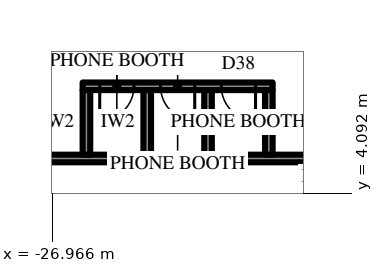
"""IFC4 building model, lengths in metres.
Left out: names, types, materials, properties, quantities, classifications, styles, units other than length and angle.
Written with IfcOpenShell. Run it as: python <this file> out.ifc"""

import sys

from ifc_helpers import new_model, si_unit, direction, frame, frame_2d, origin, place, context, subcontext, project, spatial, rectangle, extrude, element, fill, save


model = new_model("IFC4")
c1 = context("Model", 3, precision=1e-05, world=origin(), true_north=direction((0.0, 1.0)))
c2 = subcontext(c1, "Body", "Model", "MODEL_VIEW")
j1 = project(units=[si_unit("LENGTHUNIT", "METRE"), si_unit("PLANEANGLEUNIT", "RADIAN")], contexts=[c1])
p1 = place(None, origin())
s1 = spatial("IfcSite", under=j1, at=p1, CompositionType="ELEMENT")
p2 = place(p1, origin())
s2 = spatial("IfcBuilding", under=s1, at=p2, CompositionType="ELEMENT")
p3 = place(p2, frame((0.0, 0.0, 270.1)))
s3 = spatial("IfcBuildingStorey", under=s2, at=p3, CompositionType="ELEMENT", Elevation=270.1)
p4 = place(p3, frame((-15.5, 5.0, 0.0), z_axis=(0.0, 0.0, 1.0), x_axis=(-1.0, 0.0, 0.0)))
e1 = element("IfcWall", 1, at=p4, inside=s3, PredefinedType="PARTITIONING", context=c2, shape_type="SweptSolid", body=[
    extrude(rectangle(XDim=14.845, YDim=0.2, at=frame_2d((7.423, 0.0))), origin(), (0.0, 0.0, 1.0), 4.0),
])
p5 = place(p4, frame((0.985, 0.0, 0.0)))
e2 = element("IfcOpeningElement", 2, at=p5, cuts=e1, PredefinedType="OPENING", context=c2, shape_type="SweptSolid", body=[
    extrude(rectangle(XDim=1.0, YDim=2.2, at=frame_2d((0.5, 1.1))), frame((0.0, 0.11, 0.0), z_axis=(0.0, -1.0, 0.0), x_axis=(1.0, 0.0, 0.0)), (0.0, 0.0, 1.0), 0.22),
])
p6 = place(p3, frame((-21.165, 6.9, 0.0), z_axis=(0.0, 0.0, 1.0), x_axis=(-1.0, 0.0, 0.0)))
e3 = element("IfcWall", 3, at=p6, inside=s3, PredefinedType="PARTITIONING", context=c2, shape_type="SweptSolid", body=[
    extrude(rectangle(XDim=5.0, YDim=0.2, at=frame_2d((2.5, 0.0))), origin(), (0.0, 0.0, 1.0), 4.0),
])
p7 = place(p6, frame((0.45, 0.0, 0.0)))
e4 = element("IfcOpeningElement", 4, at=p7, cuts=e3, PredefinedType="OPENING", context=c2, shape_type="SweptSolid", body=[
    extrude(rectangle(XDim=0.9, YDim=2.2, at=frame_2d((0.45, 1.1))), frame((0.0, 0.11, 0.0), z_axis=(0.0, -1.0, 0.0), x_axis=(1.0, 0.0, 0.0)), (0.0, 0.0, 1.0), 0.22),
])
p8 = place(p6, frame((2.05, 0.0, 0.0)))
e5 = element("IfcOpeningElement", 5, at=p8, cuts=e3, PredefinedType="OPENING", context=c2, shape_type="SweptSolid", body=[
    extrude(rectangle(XDim=0.9, YDim=2.2, at=frame_2d((0.45, 1.1))), frame((0.0, 0.11, 0.0), z_axis=(0.0, -1.0, 0.0), x_axis=(1.0, 0.0, 0.0)), (0.0, 0.0, 1.0), 0.22),
])
p9 = place(p6, frame((3.65, 0.0, 0.0)))
e6 = element("IfcOpeningElement", 6, at=p9, cuts=e3, PredefinedType="OPENING", context=c2, shape_type="SweptSolid", body=[
    extrude(rectangle(XDim=0.9, YDim=2.2, at=frame_2d((0.45, 1.1))), frame((0.0, 0.11, 0.0), z_axis=(0.0, -1.0, 0.0), x_axis=(1.0, 0.0, 0.0)), (0.0, 0.0, 1.0), 0.22),
])
for number, where, z_axis, x_axis in (
    (7, (-21.265, 5.1, 0.0), (0.0, 0.0, 1.0), (0.0, 1.0, 0.0)),
    (8, (-22.865, 5.1, 0.0), (0.0, 0.0, 1.0), (0.0, 1.0, 0.0)),
    (9, (-24.465, 5.1, 0.0), (0.0, 0.0, 1.0), (0.0, 1.0, 0.0)),
    (10, (-26.065, 5.1, 0.0), (0.0, 0.0, 1.0), (0.0, 1.0, 0.0)),
):
    element("IfcWall", number, at=place(p3, frame(where, z_axis=z_axis, x_axis=x_axis)), inside=s3, PredefinedType="PARTITIONING", context=c2, shape_type="SweptSolid", body=[
        extrude(rectangle(XDim=1.7, YDim=0.2, at=frame_2d((0.85, 0.0))), origin(), (0.0, 0.0, 1.0), 4.0),
    ])
p10 = place(p7, origin())
e11 = element("IfcDoor", 11, at=p10, inside=s3, OperationType="SINGLE_SWING_RIGHT", PredefinedType="DOOR", context=c2, shape_type="SweptSolid", body=[
    extrude(rectangle(XDim=0.9, YDim=2.2, at=frame_2d((0.45, 1.1))), frame((0.0, 0.025, 0.0), z_axis=(0.0, -1.0, 0.0), x_axis=(1.0, 0.0, 0.0)), (0.0, 0.0, 1.0), 0.05),
])
fill(e4, e11)
p11 = place(p8, origin())
e12 = element("IfcDoor", 12, at=p11, inside=s3, OperationType="SINGLE_SWING_RIGHT", PredefinedType="DOOR", context=c2, shape_type="SweptSolid", body=[
    extrude(rectangle(XDim=0.9, YDim=2.2, at=frame_2d((0.45, 1.1))), frame((0.0, 0.025, 0.0), z_axis=(0.0, -1.0, 0.0), x_axis=(1.0, 0.0, 0.0)), (0.0, 0.0, 1.0), 0.05),
])
fill(e5, e12)
p12 = place(p9, origin())
e13 = element("IfcDoor", 13, at=p12, inside=s3, OperationType="SINGLE_SWING_LEFT", PredefinedType="DOOR", context=c2, shape_type="SweptSolid", body=[
    extrude(rectangle(XDim=0.9, YDim=2.2, at=frame_2d((0.45, 1.1))), frame((0.0, 0.025, 0.0), z_axis=(0.0, -1.0, 0.0), x_axis=(1.0, 0.0, 0.0)), (0.0, 0.0, 1.0), 0.05),
])
fill(e6, e13)
save(model, sys.argv[1])
